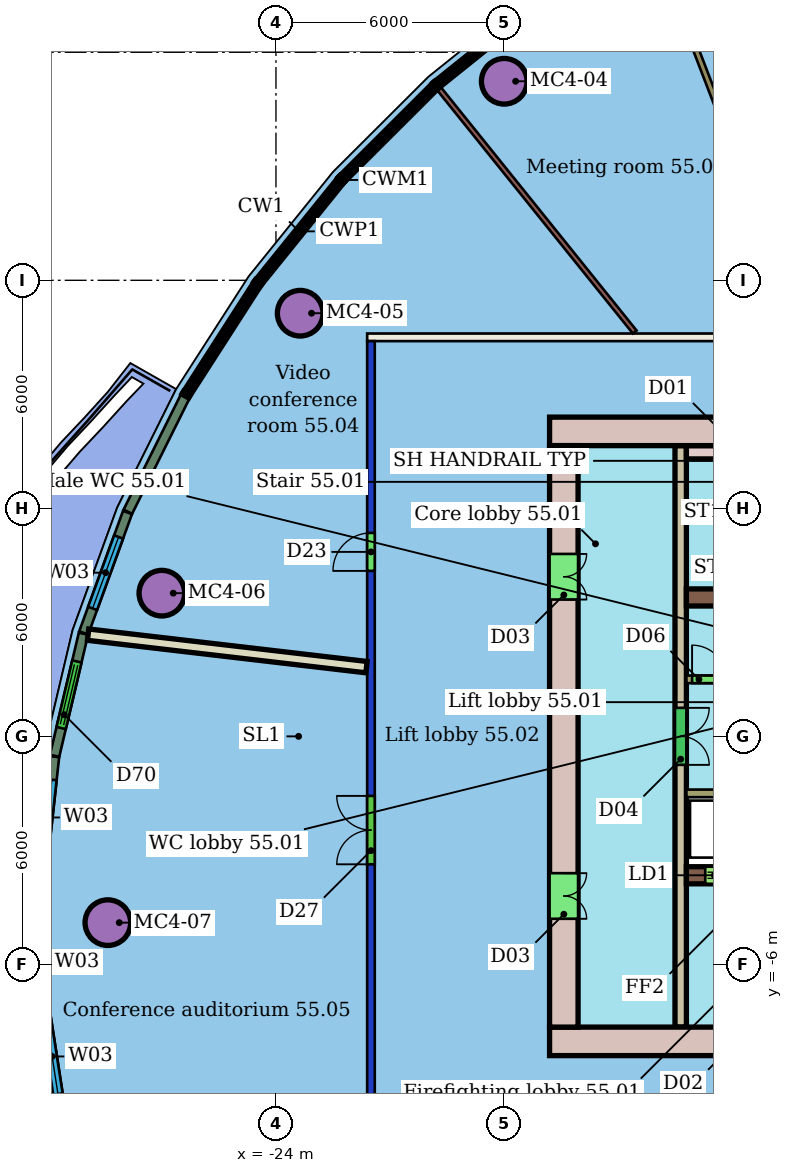
"""IFC4 building model, lengths in metres.
Left out: names, types, materials, properties, quantities, classifications, styles, units other than length and angle.
Written with IfcOpenShell. Run it as: python <this file> out.ifc"""

import sys

from ifc_helpers import new_model, si_unit, direction, frame, frame_2d, origin, origin_2d, place, context, subcontext, project, spatial, rectangle, hollow_circle, extrude, element, fill, save


model = new_model("IFC4")
c1 = context("Model", 3, precision=1e-05, world=origin(), true_north=direction((0.0, 1.0)))
c2 = subcontext(c1, "Body", "Model", "MODEL_VIEW")
j1 = project(units=[si_unit("LENGTHUNIT", "METRE"), si_unit("PLANEANGLEUNIT", "RADIAN")], contexts=[c1])
p1 = place(None, origin())
s1 = spatial("IfcSite", under=j1, at=p1, CompositionType="ELEMENT")
p2 = place(p1, origin())
s2 = spatial("IfcBuilding", under=s1, at=p2, CompositionType="ELEMENT")
p3 = place(p2, frame((0.0, 0.0, 224.5)))
s3 = spatial("IfcBuildingStorey", under=s2, at=p3, CompositionType="ELEMENT", Elevation=224.5)
for number, where, z_axis, x_axis in (
    (1, (-17.993, 17.237, 0.0), (0.0, 0.0, 1.0), (1.0, 0.0, 0.0)),
    (2, (-23.363, 11.134, 0.0), (0.0, 0.0, 1.0), (1.0, 0.0, 0.0)),
    (3, (-27.003, 3.768, 0.0), (0.0, 0.0, 1.0), (1.0, 0.0, 0.0)),
    (4, (-28.424, -4.901, 0.0), (0.0, 0.0, 1.0), (1.0, 0.0, 0.0)),
):
    element("IfcColumn", number, at=place(p3, frame(where, z_axis=z_axis, x_axis=x_axis)), inside=s3, PredefinedType="COLUMN", context=c2, shape_type="SweptSolid", body=[
        extrude(hollow_circle(Radius=0.6, WallThickness=0.045, at=origin_2d()), origin(), (0.0, 0.0, 1.0), 3.45),
    ])
p4 = place(p3, frame((-21.5, -10.4, 0.0), z_axis=(0.0, 0.0, 1.0), x_axis=(0.0, 1.0, 0.0)))
e5 = element("IfcWall", 5, at=p4, inside=s3, PredefinedType="PARTITIONING", context=c2, shape_type="SweptSolid", body=[
    extrude(rectangle(XDim=20.8, YDim=0.2, at=frame_2d((10.4, 0.0))), origin(), (0.0, 0.0, 1.0), 3.05),
])
p5 = place(p4, frame((14.754, 0.0, 0.0)))
e6 = element("IfcOpeningElement", 6, at=p5, cuts=e5, PredefinedType="OPENING", context=c2, shape_type="SweptSolid", body=[
    extrude(rectangle(XDim=1.0, YDim=2.4, at=frame_2d((0.5, 1.2))), frame((0.0, 0.11, 0.0), z_axis=(0.0, -1.0, 0.0), x_axis=(1.0, 0.0, 0.0)), (0.0, 0.0, 1.0), 0.22),
])
p6 = place(p4, frame((7.034, 0.0, 0.0)))
e7 = element("IfcOpeningElement", 7, at=p6, cuts=e5, PredefinedType="OPENING", context=c2, shape_type="SweptSolid", body=[
    extrude(rectangle(XDim=1.8, YDim=2.4, at=frame_2d((0.9, 1.2))), frame((0.0, 0.11, 0.0), z_axis=(0.0, -1.0, 0.0), x_axis=(1.0, 0.0, 0.0)), (0.0, 0.0, 1.0), 0.22),
])
p7 = place(p3, frame((-21.6, 10.5, 0.0), z_axis=(0.0, 0.0, 1.0), x_axis=(1.0, 0.0, 0.0)))
e8 = element("IfcWall", 8, at=p7, inside=s3, PredefinedType="PARTITIONING", context=c2, shape_type="SweptSolid", body=[
    extrude(rectangle(XDim=31.2, YDim=0.2, at=frame_2d((15.6, 0.0))), origin(), (0.0, 0.0, 1.0), 3.45),
])
p8 = place(p7, frame((20.263, 0.0, 0.0)))
e9 = element("IfcOpeningElement", 9, at=p8, cuts=e8, PredefinedType="OPENING", context=c2, shape_type="SweptSolid", body=[
    extrude(rectangle(XDim=1.0, YDim=2.4, at=frame_2d((0.5, 1.2))), frame((0.0, 0.11, 0.0), z_axis=(0.0, -1.0, 0.0), x_axis=(1.0, 0.0, 0.0)), (0.0, 0.0, 1.0), 0.22),
])
p9 = place(p7, frame((12.806, 0.0, 0.0)))
e10 = element("IfcOpeningElement", 10, at=p9, cuts=e8, PredefinedType="OPENING", context=c2, shape_type="SweptSolid", body=[
    extrude(rectangle(XDim=0.9, YDim=2.1, at=frame_2d((0.45, 1.05))), frame((0.0, 0.11, 0.0), z_axis=(0.0, -1.0, 0.0), x_axis=(1.0, 0.0, 0.0)), (0.0, 0.0, 1.0), 0.22),
])
p10 = place(p7, frame((9.389, 0.0, 0.0)))
e11 = element("IfcOpeningElement", 11, at=p10, cuts=e8, PredefinedType="OPENING", context=c2, shape_type="SweptSolid", body=[
    extrude(rectangle(XDim=0.9, YDim=2.1, at=frame_2d((0.45, 1.05))), frame((0.0, 0.11, 0.0), z_axis=(0.0, -1.0, 0.0), x_axis=(1.0, 0.0, 0.0)), (0.0, 0.0, 1.0), 0.22),
])
p11 = place(p7, frame((25.454, 0.0, 0.0)))
e12 = element("IfcOpeningElement", 12, at=p11, cuts=e8, PredefinedType="OPENING", context=c2, shape_type="SweptSolid", body=[
    extrude(rectangle(XDim=1.2, YDim=2.4, at=frame_2d((0.6, 1.2))), frame((0.0, 0.11, 0.0), z_axis=(0.0, -1.0, 0.0), x_axis=(1.0, 0.0, 0.0)), (0.0, 0.0, 1.0), 0.22),
])
p12 = place(p3, frame((-14.097, 21.057, 0.0), z_axis=(0.0, 0.0, 1.0), x_axis=(0.358907338181, -0.93337319578, 0.0)))
e13 = element("IfcWall", 13, at=p12, inside=s3, PredefinedType="PARTITIONING", context=c2, shape_type="SweptSolid", body=[
    extrude(rectangle(XDim=11.174, YDim=0.15, at=frame_2d((5.587, 0.0))), origin(), (0.0, 0.0, 1.0), 3.45),
])
p13 = place(p3, frame((-19.706, 17.038, 0.0), z_axis=(0.0, 0.0, 1.0), x_axis=(0.626795529624, -0.77918378066, 0.0)))
e14 = element("IfcWall", 14, at=p13, inside=s3, PredefinedType="PARTITIONING", context=c2, shape_type="SweptSolid", body=[
    extrude(rectangle(XDim=8.212, YDim=0.125, at=frame_2d((4.106, 0.0))), origin(), (0.0, 0.0, 1.0), 3.45),
])
p14 = place(p3, frame((-28.943, 2.676, 0.0), z_axis=(0.0, 0.0, 1.0), x_axis=(0.993265805872, -0.115857839117, 0.0)))
e15 = element("IfcWall", 15, at=p14, inside=s3, PredefinedType="PARTITIONING", context=c2, shape_type="SweptSolid", body=[
    extrude(rectangle(XDim=7.375, YDim=0.3, at=frame_2d((3.688, 0.0))), origin(), (0.0, 0.0, 1.0), 3.45),
])
p15 = place(p3, frame((-26.39, 8.94, 0.0), z_axis=(0.0, 0.0, 1.0), x_axis=(-0.445538884837, -0.895262588349, 0.0)))
e16 = element("IfcWall", 16, at=p15, inside=s3, PredefinedType="SOLIDWALL", context=c2, shape_type="SweptSolid", body=[
    extrude(rectangle(XDim=3.384, YDim=0.25, at=frame_2d((1.692, 0.0))), origin(), (0.0, 0.0, 1.0), 3.1),
])
p16 = place(p3, frame((-27.906, 5.89, 0.0), z_axis=(0.0, 0.0, 1.0), x_axis=(-0.341964011847, -0.939713049075, 0.0)))
e17 = element("IfcWall", 17, at=p16, inside=s3, PredefinedType="SOLIDWALL", context=c2, shape_type="SweptSolid", body=[
    extrude(rectangle(XDim=3.371, YDim=0.25, at=frame_2d((1.686, 0.0))), origin(), (0.0, 0.0, 1.0), 3.1),
])
p17 = place(p16, frame((0.686, 0.0, 0.9)))
e18 = element("IfcOpeningElement", 18, at=p17, cuts=e17, PredefinedType="OPENING", context=c2, shape_type="SweptSolid", body=[
    extrude(rectangle(XDim=2.0, YDim=2.1, at=frame_2d((1.0, 1.05))), frame((0.0, 0.135, 0.0), z_axis=(0.0, -1.0, 0.0), x_axis=(1.0, 0.0, 0.0)), (0.0, 0.0, 1.0), 0.27),
])
p18 = place(p3, frame((-29.066, 2.701, 0.0), z_axis=(0.0, 0.0, 1.0), x_axis=(-0.229983418088, -0.973194547562, 0.0)))
e19 = element("IfcWall", 19, at=p18, inside=s3, PredefinedType="SOLIDWALL", context=c2, shape_type="SweptSolid", body=[
    extrude(rectangle(XDim=3.3, YDim=0.25, at=frame_2d((1.65, 0.0))), origin(), (0.0, 0.0, 1.0), 3.1),
])
p19 = place(p18, frame((0.75, 0.0, 0.0)))
e20 = element("IfcOpeningElement", 20, at=p19, cuts=e19, PredefinedType="OPENING", context=c2, shape_type="SweptSolid", body=[
    extrude(rectangle(XDim=1.8, YDim=2.4, at=frame_2d((0.9, 1.2))), frame((0.0, 0.135, 0.0), z_axis=(0.0, -1.0, 0.0), x_axis=(1.0, 0.0, 0.0)), (0.0, 0.0, 1.0), 0.27),
])
p20 = place(p3, frame((-29.829, -0.534, 0.0), z_axis=(0.0, 0.0, 1.0), x_axis=(-0.10972407218, -0.993962085788, 0.0)))
e21 = element("IfcWall", 21, at=p20, inside=s3, PredefinedType="SOLIDWALL", context=c2, shape_type="SweptSolid", body=[
    extrude(rectangle(XDim=3.22, YDim=0.25, at=frame_2d((1.61, 0.0))), origin(), (0.0, 0.0, 1.0), 3.1),
])
p21 = place(p20, frame((0.61, 0.0, 0.9)))
e22 = element("IfcOpeningElement", 22, at=p21, cuts=e21, PredefinedType="OPENING", context=c2, shape_type="SweptSolid", body=[
    extrude(rectangle(XDim=2.0, YDim=2.1, at=frame_2d((1.0, 1.05))), frame((0.0, 0.135, 0.0), z_axis=(0.0, -1.0, 0.0), x_axis=(1.0, 0.0, 0.0)), (0.0, 0.0, 1.0), 0.27),
])
p22 = place(p3, frame((-30.123, -6.916, 0.0), z_axis=(0.0, 0.0, 1.0), x_axis=(0.15305011878, -0.98821842785, 0.0)))
e23 = element("IfcWall", 23, at=p22, inside=s3, PredefinedType="SOLIDWALL", context=c2, shape_type="SweptSolid", body=[
    extrude(rectangle(XDim=3.048, YDim=0.25, at=frame_2d((1.524, 0.0))), origin(), (0.0, 0.0, 1.0), 3.1),
])
p23 = place(p22, frame((0.524, 0.0, 0.9)))
e24 = element("IfcOpeningElement", 24, at=p23, cuts=e23, PredefinedType="OPENING", context=c2, shape_type="SweptSolid", body=[
    extrude(rectangle(XDim=2.0, YDim=2.1, at=frame_2d((1.0, 1.05))), frame((0.0, 0.135, 0.0), z_axis=(0.0, -1.0, 0.0), x_axis=(1.0, 0.0, 0.0)), (0.0, 0.0, 1.0), 0.27),
])
p24 = place(p3, frame((-6.0, 8.025, 0.0), z_axis=(0.0, 0.0, 1.0), x_axis=(-1.0, 0.0, 0.0)))
e25 = element("IfcWall", 25, at=p24, inside=s3, PredefinedType="SHEAR", context=c2, shape_type="SweptSolid", body=[
    extrude(rectangle(XDim=10.8, YDim=0.75, at=frame_2d((5.4, 0.0))), origin(), (0.0, 0.0, 1.0), 3.3),
])
p25 = place(p24, frame((5.2, 0.0, 0.0)))
e26 = element("IfcOpeningElement", 26, at=p25, cuts=e25, PredefinedType="OPENING", context=c2, shape_type="SweptSolid", body=[
    extrude(rectangle(XDim=1.2, YDim=2.1, at=frame_2d((0.6, 1.05))), frame((0.0, 0.385, 0.0), z_axis=(0.0, -1.0, 0.0), x_axis=(1.0, 0.0, 0.0)), (0.0, 0.0, 1.0), 0.77),
])
p26 = place(p3, frame((-16.8, -8.025, 0.0), z_axis=(0.0, 0.0, 1.0), x_axis=(1.0, 0.0, 0.0)))
e27 = element("IfcWall", 27, at=p26, inside=s3, PredefinedType="SHEAR", context=c2, shape_type="SweptSolid", body=[
    extrude(rectangle(XDim=21.6, YDim=0.75, at=frame_2d((10.8, 0.0))), origin(), (0.0, 0.0, 1.0), 3.3),
])
p27 = place(p26, frame((4.8, 0.0, 0.0)))
e28 = element("IfcOpeningElement", 28, at=p27, cuts=e27, PredefinedType="OPENING", context=c2, shape_type="SweptSolid", body=[
    extrude(rectangle(XDim=1.2, YDim=2.1, at=frame_2d((0.6, 1.05))), frame((0.0, 0.385, 0.0), z_axis=(0.0, -1.0, 0.0), x_axis=(1.0, 0.0, 0.0)), (0.0, 0.0, 1.0), 0.77),
])
p28 = place(p3, frame((-16.425, 7.65, 0.0), z_axis=(0.0, 0.0, 1.0), x_axis=(0.0, -1.0, 0.0)))
e29 = element("IfcWall", 29, at=p28, inside=s3, PredefinedType="SHEAR", context=c2, shape_type="SweptSolid", body=[
    extrude(rectangle(XDim=15.3, YDim=0.75, at=frame_2d((7.65, 0.0))), origin(), (0.0, 0.0, 1.0), 3.3),
])
p29 = place(p28, frame((11.25, 0.0, 0.0)))
e30 = element("IfcOpeningElement", 30, at=p29, cuts=e29, PredefinedType="OPENING", context=c2, shape_type="SweptSolid", body=[
    extrude(rectangle(XDim=1.2, YDim=2.1, at=frame_2d((0.6, 1.05))), frame((0.0, 0.385, 0.0), z_axis=(0.0, -1.0, 0.0), x_axis=(1.0, 0.0, 0.0)), (0.0, 0.0, 1.0), 0.77),
])
p30 = place(p28, frame((2.85, 0.0, 0.0)))
e31 = element("IfcOpeningElement", 31, at=p30, cuts=e29, PredefinedType="OPENING", context=c2, shape_type="SweptSolid", body=[
    extrude(rectangle(XDim=1.2, YDim=2.1, at=frame_2d((0.6, 1.05))), frame((0.0, 0.385, 0.0), z_axis=(0.0, -1.0, 0.0), x_axis=(1.0, 0.0, 0.0)), (0.0, 0.0, 1.0), 0.77),
])
p31 = place(p3, frame((-13.2, 3.655, 0.0), z_axis=(0.0, 0.0, 1.0), x_axis=(1.0, 0.0, 0.0)))
e32 = element("IfcWall", 32, at=p31, inside=s3, PredefinedType="SHEAR", context=c2, shape_type="SweptSolid", body=[
    extrude(rectangle(XDim=7.2, YDim=0.45, at=frame_2d((3.6, 0.0))), origin(), (0.0, 0.0, 1.0), 3.3),
])
p32 = place(p3, frame((-13.2, -3.655, 0.0), z_axis=(0.0, 0.0, 1.0), x_axis=(1.0, 0.0, 0.0)))
e33 = element("IfcWall", 33, at=p32, inside=s3, PredefinedType="SHEAR", context=c2, shape_type="SweptSolid", body=[
    extrude(rectangle(XDim=7.2, YDim=0.45, at=frame_2d((3.6, 0.0))), origin(), (0.0, 0.0, 1.0), 3.3),
])
p33 = place(p32, frame((0.496, 0.0, 0.0)))
e34 = element("IfcOpeningElement", 34, at=p33, cuts=e33, PredefinedType="OPENING", context=c2, shape_type="SweptSolid", body=[
    extrude(rectangle(XDim=1.2, YDim=2.1, at=frame_2d((0.6, 1.05))), frame((0.0, 0.235, 0.0), z_axis=(0.0, -1.0, 0.0), x_axis=(1.0, 0.0, 0.0)), (0.0, 0.0, 1.0), 0.47),
])
p34 = place(p32, frame((2.938, 0.0, 0.0)))
e35 = element("IfcOpeningElement", 35, at=p34, cuts=e33, PredefinedType="OPENING", context=c2, shape_type="SweptSolid", body=[
    extrude(rectangle(XDim=1.2, YDim=2.1, at=frame_2d((0.6, 1.05))), frame((0.0, 0.235, 0.0), z_axis=(0.0, -1.0, 0.0), x_axis=(1.0, 0.0, 0.0)), (0.0, 0.0, 1.0), 0.47),
])
p35 = place(p3, frame((-13.35, 7.65, 0.0), z_axis=(0.0, 0.0, 1.0), x_axis=(0.0, -1.0, 0.0)))
e36 = element("IfcWall", 36, at=p35, inside=s3, PredefinedType="SHEAR", context=c2, shape_type="SweptSolid", body=[
    extrude(rectangle(XDim=15.3, YDim=0.3, at=frame_2d((7.65, 0.0))), origin(), (0.0, 0.0, 1.0), 3.3),
])
p36 = place(p35, frame((6.9, 0.0, 0.0)))
e37 = element("IfcOpeningElement", 37, at=p36, cuts=e36, PredefinedType="OPENING", context=c2, shape_type="SweptSolid", body=[
    extrude(rectangle(XDim=1.5, YDim=2.1, at=frame_2d((0.75, 1.05))), frame((0.0, 0.16, 0.0), z_axis=(0.0, -1.0, 0.0), x_axis=(1.0, 0.0, 0.0)), (0.0, 0.0, 1.0), 0.32),
])
p37 = place(p3, frame((-13.2, 1.5, 0.0), z_axis=(0.0, 0.0, 1.0), x_axis=(1.0, 0.0, 0.0)))
e38 = element("IfcWall", 38, at=p37, inside=s3, PredefinedType="SHEAR", context=c2, shape_type="SweptSolid", body=[
    extrude(rectangle(XDim=14.4, YDim=0.2, at=frame_2d((7.2, 0.0))), origin(), (0.0, 0.0, 1.0), 3.3),
])
p38 = place(p37, frame((10.312, 0.0, 0.0)))
e39 = element("IfcOpeningElement", 39, at=p38, cuts=e38, PredefinedType="OPENING", context=c2, shape_type="SweptSolid", body=[
    extrude(rectangle(XDim=1.1, YDim=2.1, at=frame_2d((0.55, 1.05))), frame((0.0, 0.11, 0.0), z_axis=(0.0, -1.0, 0.0), x_axis=(1.0, 0.0, 0.0)), (0.0, 0.0, 1.0), 0.22),
])
p39 = place(p37, frame((12.754, 0.0, 0.0)))
e40 = element("IfcOpeningElement", 40, at=p39, cuts=e38, PredefinedType="OPENING", context=c2, shape_type="SweptSolid", body=[
    extrude(rectangle(XDim=1.1, YDim=2.1, at=frame_2d((0.55, 1.05))), frame((0.0, 0.11, 0.0), z_axis=(0.0, -1.0, 0.0), x_axis=(1.0, 0.0, 0.0)), (0.0, 0.0, 1.0), 0.22),
])
p40 = place(p37, frame((0.15, 0.0, 0.0)))
e41 = element("IfcOpeningElement", 41, at=p40, cuts=e38, PredefinedType="OPENING", context=c2, shape_type="SweptSolid", body=[
    extrude(rectangle(XDim=0.9, YDim=2.1, at=frame_2d((0.45, 1.05))), frame((0.0, 0.11, 0.0), z_axis=(0.0, -1.0, 0.0), x_axis=(1.0, 0.0, 0.0)), (0.0, 0.0, 1.0), 0.22),
])
p41 = place(p37, frame((4.222, 0.0, 0.0)))
e42 = element("IfcOpeningElement", 42, at=p41, cuts=e38, PredefinedType="OPENING", context=c2, shape_type="SweptSolid", body=[
    extrude(rectangle(XDim=0.9, YDim=2.1, at=frame_2d((0.45, 1.05))), frame((0.0, 0.11, 0.0), z_axis=(0.0, -1.0, 0.0), x_axis=(1.0, 0.0, 0.0)), (0.0, 0.0, 1.0), 0.22),
])
p42 = place(p37, frame((8.367, 0.0, 0.0)))
e43 = element("IfcOpeningElement", 43, at=p42, cuts=e38, PredefinedType="OPENING", context=c2, shape_type="SweptSolid", body=[
    extrude(rectangle(XDim=1.0, YDim=2.1, at=frame_2d((0.5, 1.05))), frame((0.0, 0.11, 0.0), z_axis=(0.0, -1.0, 0.0), x_axis=(1.0, 0.0, 0.0)), (0.0, 0.0, 1.0), 0.22),
])
p43 = place(p3, frame((1.2, -1.5, 0.0), z_axis=(0.0, 0.0, 1.0), x_axis=(-1.0, 0.0, 0.0)))
e44 = element("IfcWall", 44, at=p43, inside=s3, PredefinedType="SHEAR", context=c2, shape_type="SweptSolid", body=[
    extrude(rectangle(XDim=14.4, YDim=0.2, at=frame_2d((7.2, 0.0))), origin(), (0.0, 0.0, 1.0), 3.3),
])
p44 = place(p43, frame((7.821, 0.0, 0.0)))
e45 = element("IfcOpeningElement", 45, at=p44, cuts=e44, PredefinedType="OPENING", context=c2, shape_type="SweptSolid", body=[
    extrude(rectangle(XDim=1.2, YDim=2.1, at=frame_2d((0.6, 1.05))), frame((0.0, 0.11, 0.0), z_axis=(0.0, -1.0, 0.0), x_axis=(1.0, 0.0, 0.0)), (0.0, 0.0, 1.0), 0.22),
])
p45 = place(p43, frame((0.546, 0.0, 0.0)))
e46 = element("IfcOpeningElement", 46, at=p45, cuts=e44, PredefinedType="OPENING", context=c2, shape_type="SweptSolid", body=[
    extrude(rectangle(XDim=1.1, YDim=2.1, at=frame_2d((0.55, 1.05))), frame((0.0, 0.11, 0.0), z_axis=(0.0, -1.0, 0.0), x_axis=(1.0, 0.0, 0.0)), (0.0, 0.0, 1.0), 0.22),
])
p46 = place(p43, frame((5.632, 0.0, 0.0)))
e47 = element("IfcOpeningElement", 47, at=p46, cuts=e44, PredefinedType="OPENING", context=c2, shape_type="SweptSolid", body=[
    extrude(rectangle(XDim=1.0, YDim=2.1, at=frame_2d((0.5, 1.05))), frame((0.0, 0.11, 0.0), z_axis=(0.0, -1.0, 0.0), x_axis=(1.0, 0.0, 0.0)), (0.0, 0.0, 1.0), 0.22),
])
p47 = place(p43, frame((2.592, 0.0, 0.0)))
e48 = element("IfcOpeningElement", 48, at=p47, cuts=e44, PredefinedType="OPENING", context=c2, shape_type="SweptSolid", body=[
    extrude(rectangle(XDim=1.0, YDim=2.1, at=frame_2d((0.5, 1.05))), frame((0.0, 0.11, 0.0), z_axis=(0.0, -1.0, 0.0), x_axis=(1.0, 0.0, 0.0)), (0.0, 0.0, 1.0), 0.22),
])
p48 = place(p3, frame((-13.2, 7.475, 0.0), z_axis=(0.0, 0.0, 1.0), x_axis=(1.0, 0.0, 0.0)))
e49 = element("IfcWall", 49, at=p48, inside=s3, PredefinedType="SHEAR", context=c2, shape_type="SweptSolid", body=[
    extrude(rectangle(XDim=0.8, YDim=0.35, at=frame_2d((0.4, 0.0))), origin(), (0.0, 0.0, 1.0), 3.3),
])
p49 = place(p5, origin())
e50 = element("IfcDoor", 50, at=p49, inside=s3, OperationType="SINGLE_SWING_LEFT", PredefinedType="DOOR", context=c2, shape_type="SweptSolid", body=[
    extrude(rectangle(XDim=1.0, YDim=2.4, at=frame_2d((0.5, 1.2))), frame((0.0, 0.025, 0.0), z_axis=(0.0, -1.0, 0.0), x_axis=(1.0, 0.0, 0.0)), (0.0, 0.0, 1.0), 0.05),
])
fill(e6, e50)
p50 = place(p6, origin())
e51 = element("IfcDoor", 51, at=p50, inside=s3, OperationType="DOUBLE_DOOR_SINGLE_SWING", PredefinedType="DOOR", context=c2, shape_type="SweptSolid", body=[
    extrude(rectangle(XDim=1.8, YDim=2.4, at=frame_2d((0.9, 1.2))), frame((0.0, 0.025, 0.0), z_axis=(0.0, -1.0, 0.0), x_axis=(1.0, 0.0, 0.0)), (0.0, 0.0, 1.0), 0.05),
])
fill(e7, e51)
p51 = place(p17, origin())
e52 = element("IfcWindow", 52, at=p51, inside=s3, PartitioningType="SINGLE_PANEL", PredefinedType="WINDOW", context=c2, shape_type="SweptSolid", body=[
    extrude(rectangle(XDim=2.0, YDim=2.1, at=frame_2d((1.0, 1.05))), frame((0.0, 0.03, 0.0), z_axis=(0.0, -1.0, 0.0), x_axis=(1.0, 0.0, 0.0)), (0.0, 0.0, 1.0), 0.06),
])
fill(e18, e52)
p52 = place(p19, origin())
e53 = element("IfcDoor", 53, at=p52, inside=s3, OperationType="DOUBLE_DOOR_SLIDING", PredefinedType="DOOR", context=c2, shape_type="SweptSolid", body=[
    extrude(rectangle(XDim=1.8, YDim=2.4, at=frame_2d((0.9, 1.2))), frame((0.0, 0.025, 0.0), z_axis=(0.0, -1.0, 0.0), x_axis=(1.0, 0.0, 0.0)), (0.0, 0.0, 1.0), 0.05),
])
fill(e20, e53)
p53 = place(p21, origin())
e54 = element("IfcWindow", 54, at=p53, inside=s3, PartitioningType="SINGLE_PANEL", PredefinedType="WINDOW", context=c2, shape_type="SweptSolid", body=[
    extrude(rectangle(XDim=2.0, YDim=2.1, at=frame_2d((1.0, 1.05))), frame((0.0, 0.03, 0.0), z_axis=(0.0, -1.0, 0.0), x_axis=(1.0, 0.0, 0.0)), (0.0, 0.0, 1.0), 0.06),
])
fill(e22, e54)
p54 = place(p23, origin())
e55 = element("IfcWindow", 55, at=p54, inside=s3, PartitioningType="SINGLE_PANEL", PredefinedType="WINDOW", context=c2, shape_type="SweptSolid", body=[
    extrude(rectangle(XDim=2.0, YDim=2.1, at=frame_2d((1.0, 1.05))), frame((0.0, 0.03, 0.0), z_axis=(0.0, -1.0, 0.0), x_axis=(1.0, 0.0, 0.0)), (0.0, 0.0, 1.0), 0.06),
])
fill(e24, e55)
p55 = place(p29, origin())
e56 = element("IfcDoor", 56, at=p55, inside=s3, OperationType="DOUBLE_DOOR_SINGLE_SWING", PredefinedType="NOTDEFINED", context=c2, shape_type="SweptSolid", body=[
    extrude(rectangle(XDim=1.2, YDim=2.1, at=frame_2d((0.6, 1.05))), frame((0.0, 0.025, 0.0), z_axis=(0.0, -1.0, 0.0), x_axis=(1.0, 0.0, 0.0)), (0.0, 0.0, 1.0), 0.05),
])
fill(e30, e56)
p56 = place(p30, origin())
e57 = element("IfcDoor", 57, at=p56, inside=s3, OperationType="DOUBLE_DOOR_SINGLE_SWING", PredefinedType="NOTDEFINED", context=c2, shape_type="SweptSolid", body=[
    extrude(rectangle(XDim=1.2, YDim=2.1, at=frame_2d((0.6, 1.05))), frame((0.0, 0.025, 0.0), z_axis=(0.0, -1.0, 0.0), x_axis=(1.0, 0.0, 0.0)), (0.0, 0.0, 1.0), 0.05),
])
fill(e31, e57)
p57 = place(p33, origin())
e58 = element("IfcDoor", 58, at=p57, inside=s3, OperationType="DOUBLE_DOOR_SLIDING", PredefinedType="NOTDEFINED", context=c2, shape_type="SweptSolid", body=[
    extrude(rectangle(XDim=1.2, YDim=2.1, at=frame_2d((0.6, 1.05))), frame((0.0, 0.025, 0.0), z_axis=(0.0, -1.0, 0.0), x_axis=(1.0, 0.0, 0.0)), (0.0, 0.0, 1.0), 0.05),
])
fill(e34, e58)
p58 = place(p36, origin())
e59 = element("IfcDoor", 59, at=p58, inside=s3, OperationType="DOUBLE_DOOR_SINGLE_SWING", PredefinedType="NOTDEFINED", context=c2, shape_type="SweptSolid", body=[
    extrude(rectangle(XDim=1.5, YDim=2.1, at=frame_2d((0.75, 1.05))), frame((0.0, 0.025, 0.0), z_axis=(0.0, -1.0, 0.0), x_axis=(1.0, 0.0, 0.0)), (0.0, 0.0, 1.0), 0.05),
])
fill(e37, e59)
p59 = place(p40, origin())
e60 = element("IfcDoor", 60, at=p59, inside=s3, OperationType="SINGLE_SWING_LEFT", PredefinedType="NOTDEFINED", context=c2, shape_type="SweptSolid", body=[
    extrude(rectangle(XDim=0.9, YDim=2.1, at=frame_2d((0.45, 1.05))), frame((0.0, 0.025, 0.0), z_axis=(0.0, -1.0, 0.0), x_axis=(1.0, 0.0, 0.0)), (0.0, 0.0, 1.0), 0.05),
])
fill(e41, e60)
save(model, sys.argv[1])
